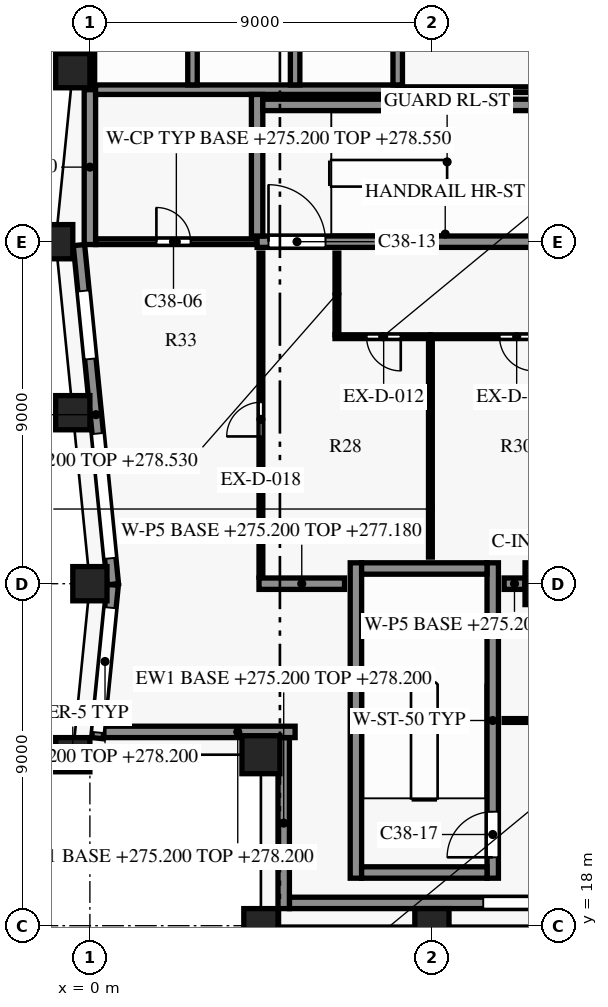
"""IFC4 building model, lengths in metres.
Left out: names, types, materials, properties, quantities, classifications, styles, units other than length and angle.
Written with IfcOpenShell. Run it as: python <this file> out.ifc"""

import sys

from ifc_helpers import new_model, si_unit, direction, frame, frame_2d, origin, origin_2d, place, context, subcontext, project, spatial, rectangle, extrude, element, fill, save


model = new_model("IFC4")
c1 = context("Model", 3, precision=1e-05, world=origin(), true_north=direction((0.0, 1.0)))
c2 = subcontext(c1, "Body", "Model", "MODEL_VIEW")
j1 = project(units=[si_unit("LENGTHUNIT", "METRE"), si_unit("PLANEANGLEUNIT", "RADIAN")], contexts=[c1])
p1 = place(None, origin())
s1 = spatial("IfcSite", under=j1, at=p1, CompositionType="ELEMENT")
p2 = place(p1, origin())
s2 = spatial("IfcBuilding", under=s1, at=p2, CompositionType="ELEMENT")
p3 = place(p2, frame((0.0, 0.0, 275.2)))
s3 = spatial("IfcBuildingStorey", under=s2, at=p3, CompositionType="ELEMENT", Elevation=275.2)
for number, where, z_axis, x_axis in (
    (1, (4.5, 18.0, 0.0), (0.0, 0.0, 1.0), (1.0, 0.0, 0.0)),
    (2, (9.0, 18.0, 0.0), (0.0, 0.0, 1.0), (1.0, 0.0, 0.0)),
    (3, (-0.45, 40.5, 0.0), (0.0, 0.0, 1.0), (-0.1, -0.995, 0.0)),
    (4, (-0.9, 36.0, 0.0), (0.0, 0.0, 1.0), (0.0, -1.0, 0.0)),
    (5, (-0.45, 31.5, 0.0), (0.0, 0.0, 1.0), (0.1, -0.995, 0.0)),
    (6, (0.0, 27.0, 0.0), (0.0, 0.0, 1.0), (0.0, -1.0, 0.0)),
    (7, (-0.45, 22.5, 0.0), (0.0, 0.0, 1.0), (-0.1, -0.995, 0.0)),
):
    element("IfcColumn", number, at=place(p3, frame(where, z_axis=z_axis, x_axis=x_axis)), inside=s3, PredefinedType="COLUMN", context=c2, shape_type="SweptSolid", body=[
        extrude(rectangle(XDim=0.9, YDim=0.9, at=origin_2d()), origin(), (0.0, 0.0, 1.0), 3.8),
    ])
p4 = place(p3, frame((4.5, 22.5, 0.0), z_axis=(0.0, 0.0, 1.0), x_axis=(1.0, 0.0, 0.0)))
e8 = element("IfcColumn", 8, at=p4, inside=s3, PredefinedType="COLUMN", context=c2, shape_type="SweptSolid", body=[
    extrude(rectangle(XDim=1.0, YDim=1.0, at=origin_2d()), origin(), (0.0, 0.0, 1.0), 3.8),
])
p5 = place(p3, frame((12.0, 27.0, 0.0), z_axis=(0.0, 0.0, 1.0), x_axis=(1.0, 0.0, 0.0)))
e9 = element("IfcColumn", 9, at=p5, inside=s3, PredefinedType="COLUMN", context=c2, shape_type="SweptSolid", body=[
    extrude(rectangle(XDim=1.1, YDim=1.1, at=origin_2d()), origin(), (0.0, 0.0, 1.0), 3.8),
])
p6 = place(p3, frame((31.05, 18.6, 0.0), z_axis=(0.0, 0.0, 1.0), x_axis=(-1.0, 0.0, 0.0)))
e10 = element("IfcWall", 10, at=p6, inside=s3, PredefinedType="SOLIDWALL", context=c2, shape_type="SweptSolid", body=[
    extrude(rectangle(XDim=25.8, YDim=0.3, at=frame_2d((12.9, 0.0))), origin(), (0.0, 0.0, 1.0), 3.0),
])
p7 = place(p6, frame((0.9, 0.0, 0.75)))
e11 = element("IfcOpeningElement", 11, at=p7, cuts=e10, PredefinedType="OPENING", context=c2, shape_type="SweptSolid", body=[
    extrude(rectangle(XDim=1.8, YDim=1.8, at=frame_2d((0.9, 0.9))), frame((0.0, 0.16, 0.0), z_axis=(0.0, -1.0, 0.0), x_axis=(1.0, 0.0, 0.0)), (0.0, 0.0, 1.0), 0.32),
])
p8 = place(p6, frame((5.4, 0.0, 0.75)))
e12 = element("IfcOpeningElement", 12, at=p8, cuts=e10, PredefinedType="OPENING", context=c2, shape_type="SweptSolid", body=[
    extrude(rectangle(XDim=1.8, YDim=1.8, at=frame_2d((0.9, 0.9))), frame((0.0, 0.16, 0.0), z_axis=(0.0, -1.0, 0.0), x_axis=(1.0, 0.0, 0.0)), (0.0, 0.0, 1.0), 0.32),
])
p9 = place(p6, frame((9.15, 0.0, 0.15)))
e13 = element("IfcOpeningElement", 13, at=p9, cuts=e10, PredefinedType="OPENING", context=c2, shape_type="SweptSolid", body=[
    extrude(rectangle(XDim=3.3, YDim=2.4, at=frame_2d((1.65, 1.2))), frame((0.0, 0.16, 0.0), z_axis=(0.0, -1.0, 0.0), x_axis=(1.0, 0.0, 0.0)), (0.0, 0.0, 1.0), 0.32),
])
p10 = place(p6, frame((13.65, 0.0, 0.15)))
e14 = element("IfcOpeningElement", 14, at=p10, cuts=e10, PredefinedType="OPENING", context=c2, shape_type="SweptSolid", body=[
    extrude(rectangle(XDim=3.3, YDim=2.4, at=frame_2d((1.65, 1.2))), frame((0.0, 0.16, 0.0), z_axis=(0.0, -1.0, 0.0), x_axis=(1.0, 0.0, 0.0)), (0.0, 0.0, 1.0), 0.32),
])
p11 = place(p6, frame((18.9, 0.0, 0.75)))
e15 = element("IfcOpeningElement", 15, at=p11, cuts=e10, PredefinedType="OPENING", context=c2, shape_type="SweptSolid", body=[
    extrude(rectangle(XDim=1.8, YDim=1.8, at=frame_2d((0.9, 0.9))), frame((0.0, 0.16, 0.0), z_axis=(0.0, -1.0, 0.0), x_axis=(1.0, 0.0, 0.0)), (0.0, 0.0, 1.0), 0.32),
])
p12 = place(p3, frame((0.604, 26.985, 0.0), z_axis=(0.0, 0.0, 1.0), x_axis=(-0.099509108728, 0.995036651225, 0.0)))
e16 = element("IfcWall", 16, at=p12, inside=s3, PredefinedType="SOLIDWALL", context=c2, shape_type="SweptSolid", body=[
    extrude(rectangle(XDim=8.97, YDim=0.3, at=frame_2d((4.485, 0.0))), origin(), (0.0, 0.0, 1.0), 3.0),
])
p13 = place(p12, frame((0.686, 0.0, 0.15)))
e17 = element("IfcOpeningElement", 17, at=p13, cuts=e16, PredefinedType="OPENING", context=c2, shape_type="SweptSolid", body=[
    extrude(rectangle(XDim=3.3, YDim=2.4, at=frame_2d((1.65, 1.2))), frame((0.0, 0.16, 0.0), z_axis=(0.0, -1.0, 0.0), x_axis=(1.0, 0.0, 0.0)), (0.0, 0.0, 1.0), 0.32),
])
p14 = place(p12, frame((5.958, 0.0, 0.75)))
e18 = element("IfcOpeningElement", 18, at=p14, cuts=e16, PredefinedType="OPENING", context=c2, shape_type="SweptSolid", body=[
    extrude(rectangle(XDim=1.8, YDim=1.8, at=frame_2d((0.9, 0.9))), frame((0.0, 0.16, 0.0), z_axis=(0.0, -1.0, 0.0), x_axis=(1.0, 0.0, 0.0)), (0.0, 0.0, 1.0), 0.32),
])
p15 = place(p3, frame((0.197, 22.935, 0.0), z_axis=(0.0, 0.0, 1.0), x_axis=(0.09951564041, 0.995035997999, 0.0)))
e19 = element("IfcWall", 19, at=p15, inside=s3, PredefinedType="SOLIDWALL", context=c2, shape_type="SweptSolid", body=[
    extrude(rectangle(XDim=4.055, YDim=0.3, at=frame_2d((2.028, 0.0))), origin(), (0.0, 0.0, 1.0), 3.0),
])
p16 = place(p15, frame((0.15, 0.0, 0.15)))
e20 = element("IfcOpeningElement", 20, at=p16, cuts=e19, PredefinedType="OPENING", context=c2, shape_type="SweptSolid", body=[
    extrude(rectangle(XDim=3.3, YDim=2.4, at=frame_2d((1.65, 1.2))), frame((0.0, 0.16, 0.0), z_axis=(0.0, -1.0, 0.0), x_axis=(1.0, 0.0, 0.0)), (0.0, 0.0, 1.0), 0.32),
])
p17 = place(p3, frame((5.4, 23.1, 0.0), z_axis=(0.0, 0.0, 1.0), x_axis=(-1.0, 0.0, 0.0)))
e21 = element("IfcWall", 21, at=p17, inside=s3, PredefinedType="SOLIDWALL", context=c2, shape_type="SweptSolid", body=[
    extrude(rectangle(XDim=5.031, YDim=0.3, at=frame_2d((2.516, 0.0))), origin(), (0.0, 0.0, 1.0), 3.0),
])
p18 = place(p3, frame((5.1, 18.45, 0.0), z_axis=(0.0, 0.0, 1.0), x_axis=(0.0, 1.0, 0.0)))
e22 = element("IfcWall", 22, at=p18, inside=s3, PredefinedType="SOLIDWALL", context=c2, shape_type="SweptSolid", body=[
    extrude(rectangle(XDim=4.5, YDim=0.3, at=frame_2d((2.25, 0.0))), origin(), (0.0, 0.0, 1.0), 3.0),
])
for number, where, z_axis, x_axis in (
    (23, (7.15, 19.4, 0.0), (0.0, 0.0, 1.0), (1.0, 0.0, 0.0)),
    (24, (7.15, 27.4, 0.0), (0.0, 0.0, 1.0), (1.0, 0.0, 0.0)),
):
    element("IfcWall", number, at=place(p3, frame(where, z_axis=z_axis, x_axis=x_axis)), inside=s3, PredefinedType="SHEAR", context=c2, shape_type="SweptSolid", body=[
        extrude(rectangle(XDim=3.3, YDim=0.3, at=frame_2d((1.65, 0.0))), origin(), (0.0, 0.0, 1.0), 3.5),
    ])
p19 = place(p3, frame((0.15, 36.0, 0.0), z_axis=(0.0, 0.0, 1.0), x_axis=(1.0, 0.0, 0.0)))
e25 = element("IfcWall", 25, at=p19, inside=s3, PredefinedType="PARTITIONING", context=c2, shape_type="SweptSolid", body=[
    extrude(rectangle(XDim=4.25, YDim=0.15, at=frame_2d((2.125, 0.0))), origin(), (0.0, 0.0, 1.0), 3.35),
])
p20 = place(p19, frame((1.6, 0.0, 0.0)))
e26 = element("IfcOpeningElement", 26, at=p20, cuts=e25, PredefinedType="OPENING", context=c2, shape_type="SweptSolid", body=[
    extrude(rectangle(XDim=0.9, YDim=2.1, at=frame_2d((0.45, 1.05))), frame((0.0, 0.085, 0.0), z_axis=(0.0, -1.0, 0.0), x_axis=(1.0, 0.0, 0.0)), (0.0, 0.0, 1.0), 0.17),
])
p21 = place(p3, frame((4.4, 36.0, 0.0), z_axis=(0.0, 0.0, 1.0), x_axis=(1.0, 0.0, 0.0)))
e27 = element("IfcWall", 27, at=p21, inside=s3, PredefinedType="SHEAR", context=c2, shape_type="SweptSolid", body=[
    extrude(rectangle(XDim=8.0, YDim=0.3, at=frame_2d((4.0, 0.0))), origin(), (0.0, 0.0, 1.0), 3.5),
])
p22 = place(p21, frame((0.3, 0.0, 0.0)))
e28 = element("IfcOpeningElement", 28, at=p22, cuts=e27, PredefinedType="OPENING", context=c2, shape_type="SweptSolid", body=[
    extrude(rectangle(XDim=1.5, YDim=2.2, at=frame_2d((0.75, 1.1))), frame((0.0, 0.16, 0.0), z_axis=(0.0, -1.0, 0.0), x_axis=(1.0, 0.0, 0.0)), (0.0, 0.0, 1.0), 0.32),
])
p23 = place(p3, frame((4.55, 39.6, 0.0), z_axis=(0.0, 0.0, 1.0), x_axis=(1.0, 0.0, 0.0)))
e29 = element("IfcWall", 29, at=p23, inside=s3, PredefinedType="SHEAR", context=c2, shape_type="SweptSolid", body=[
    extrude(rectangle(XDim=7.7, YDim=0.3, at=frame_2d((3.85, 0.0))), origin(), (0.0, 0.0, 1.0), 3.5),
])
p24 = place(p3, frame((8.1, 40.0, 0.0), z_axis=(0.0, 0.0, 1.0), x_axis=(1.0, 0.0, 0.0)))
e30 = element("IfcWall", 30, at=p24, inside=s3, PredefinedType="PARTITIONING", context=c2, shape_type="SweptSolid", body=[
    extrude(rectangle(XDim=16.125, YDim=0.15, at=frame_2d((8.062, 0.0))), origin(), (0.0, 0.0, 1.0), 3.35),
])
p25 = place(p3, frame((0.15, 40.0, 0.0), z_axis=(0.0, 0.0, 1.0), x_axis=(1.0, 0.0, 0.0)))
e31 = element("IfcWall", 31, at=p25, inside=s3, PredefinedType="SHEAR", context=c2, shape_type="SweptSolid", body=[
    extrude(rectangle(XDim=7.95, YDim=0.25, at=frame_2d((3.975, 0.0))), origin(), (0.0, 0.0, 1.0), 3.5),
])
p26 = place(p3, frame((0.0, 35.925, 0.0), z_axis=(0.0, 0.0, 1.0), x_axis=(0.0, 1.0, 0.0)))
e32 = element("IfcWall", 32, at=p26, inside=s3, PredefinedType="SHEAR", context=c2, shape_type="SweptSolid", body=[
    extrude(rectangle(XDim=4.075, YDim=0.3, at=frame_2d((2.038, 0.0))), origin(), (0.0, 0.0, 1.0), 3.5),
])
p27 = place(p3, frame((0.0, 40.0, 0.0), z_axis=(0.0, 0.0, 1.0), x_axis=(0.0, 1.0, 0.0)))
e33 = element("IfcWall", 33, at=p27, inside=s3, PredefinedType="SHEAR", context=c2, shape_type="SweptSolid", body=[
    extrude(rectangle(XDim=3.325, YDim=0.25, at=frame_2d((1.663, 0.0))), origin(), (0.0, 0.0, 1.0), 3.5),
])
p28 = place(p3, frame((2.7, 40.125, 0.0), z_axis=(0.0, 0.0, 1.0), x_axis=(0.0, 1.0, 0.0)))
e34 = element("IfcWall", 34, at=p28, inside=s3, PredefinedType="SHEAR", context=c2, shape_type="SweptSolid", body=[
    extrude(rectangle(XDim=2.95, YDim=0.25, at=frame_2d((1.475, 0.0))), origin(), (0.0, 0.0, 1.0), 3.5),
])
p29 = place(p3, frame((4.4, 36.15, 0.0), z_axis=(0.0, 0.0, 1.0), x_axis=(0.0, 1.0, 0.0)))
e35 = element("IfcWall", 35, at=p29, inside=s3, PredefinedType="SHEAR", context=c2, shape_type="SweptSolid", body=[
    extrude(rectangle(XDim=3.725, YDim=0.3, at=frame_2d((1.863, 0.0))), origin(), (0.0, 0.0, 1.0), 3.5),
])
p30 = place(p3, frame((5.4, 40.125, 0.0), z_axis=(0.0, 0.0, 1.0), x_axis=(0.0, 1.0, 0.0)))
e36 = element("IfcWall", 36, at=p30, inside=s3, PredefinedType="SHEAR", context=c2, shape_type="SweptSolid", body=[
    extrude(rectangle(XDim=2.95, YDim=0.25, at=frame_2d((1.475, 0.0))), origin(), (0.0, 0.0, 1.0), 3.5),
])
p31 = place(p3, frame((7.0, 19.25, 0.0), z_axis=(0.0, 0.0, 1.0), x_axis=(0.0, 1.0, 0.0)))
e37 = element("IfcWall", 37, at=p31, inside=s3, PredefinedType="SHEAR", context=c2, shape_type="SweptSolid", body=[
    extrude(rectangle(XDim=8.3, YDim=0.3, at=frame_2d((4.15, 0.0))), origin(), (0.0, 0.0, 1.0), 3.5),
])
p32 = place(p3, frame((8.1, 40.125, 0.0), z_axis=(0.0, 0.0, 1.0), x_axis=(0.0, 1.0, 0.0)))
e38 = element("IfcWall", 38, at=p32, inside=s3, PredefinedType="SHEAR", context=c2, shape_type="SweptSolid", body=[
    extrude(rectangle(XDim=2.95, YDim=0.25, at=frame_2d((1.475, 0.0))), origin(), (0.0, 0.0, 1.0), 3.5),
])
p33 = place(p3, frame((10.6, 19.25, 0.0), z_axis=(0.0, 0.0, 1.0), x_axis=(0.0, 1.0, 0.0)))
e39 = element("IfcWall", 39, at=p33, inside=s3, PredefinedType="SHEAR", context=c2, shape_type="SweptSolid", body=[
    extrude(rectangle(XDim=8.3, YDim=0.3, at=frame_2d((4.15, 0.0))), origin(), (0.0, 0.0, 1.0), 3.5),
])
p34 = place(p33, frame((0.55, 0.0, 0.0)))
e40 = element("IfcOpeningElement", 40, at=p34, cuts=e39, PredefinedType="OPENING", context=c2, shape_type="SweptSolid", body=[
    extrude(rectangle(XDim=1.2, YDim=2.2, at=frame_2d((0.6, 1.1))), frame((0.0, 0.16, 0.0), z_axis=(0.0, -1.0, 0.0), x_axis=(1.0, 0.0, 0.0)), (0.0, 0.0, 1.0), 0.32),
])
p35 = place(p3, frame((18.0, 23.4, 0.0), z_axis=(0.0, 0.0, 1.0), x_axis=(-1.0, 0.0, 0.0)))
e41 = element("IfcWall", 41, at=p35, inside=s3, PredefinedType="PARTITIONING", context=c2, shape_type="SweptSolid", body=[
    extrude(rectangle(XDim=7.1, YDim=0.1, at=frame_2d((3.55, 0.0))), origin(), (0.0, 0.0, 1.0), 2.73),
])
p36 = place(p35, frame((2.55, 0.0, 0.0)))
e42 = element("IfcOpeningElement", 42, at=p36, cuts=e41, PredefinedType="OPENING", context=c2, shape_type="SweptSolid", body=[
    extrude(rectangle(XDim=1.8, YDim=2.1, at=frame_2d((0.9, 1.05))), frame((0.0, 0.06, 0.0), z_axis=(0.0, -1.0, 0.0), x_axis=(1.0, 0.0, 0.0)), (0.0, 0.0, 1.0), 0.12),
])
p37 = place(p3, frame((6.7, 27.0, 0.0), z_axis=(0.0, 0.0, 1.0), x_axis=(-1.0, 0.0, 0.0)))
e43 = element("IfcWall", 43, at=p37, inside=s3, PredefinedType="PARTITIONING", context=c2, shape_type="SweptSolid", body=[
    extrude(rectangle(XDim=2.25, YDim=0.3, at=frame_2d((1.125, 0.0))), origin(), (0.0, 0.0, 1.0), 1.98),
])
p38 = place(p3, frame((10.9, 27.0, 0.0), z_axis=(0.0, 0.0, 1.0), x_axis=(1.0, 0.0, 0.0)))
e44 = element("IfcWall", 44, at=p38, inside=s3, PredefinedType="PARTITIONING", context=c2, shape_type="SweptSolid", body=[
    extrude(rectangle(XDim=0.545, YDim=0.3, at=frame_2d((0.272, 0.0))), origin(), (0.0, 0.0, 1.0), 3.33),
])
p39 = place(p3, frame((4.5, 27.17, 0.0), z_axis=(0.0, 0.0, 1.0), x_axis=(0.0, 1.0, 0.0)))
e45 = element("IfcWall", 45, at=p39, inside=s3, PredefinedType="PARTITIONING", context=c2, shape_type="SweptSolid", body=[
    extrude(rectangle(XDim=8.53, YDim=0.1, at=frame_2d((4.265, 0.0))), origin(), (0.0, 0.0, 1.0), 1.98),
])
p40 = place(p39, frame((3.705, 0.0, 0.0)))
e46 = element("IfcOpeningElement", 46, at=p40, cuts=e45, PredefinedType="OPENING", context=c2, shape_type="SweptSolid", body=[
    extrude(rectangle(XDim=0.9, YDim=2.1, at=frame_2d((0.45, 1.05))), frame((0.0, 0.06, 0.0), z_axis=(0.0, -1.0, 0.0), x_axis=(1.0, 0.0, 0.0)), (0.0, 0.0, 1.0), 0.12),
])
p41 = place(p3, frame((8.96, 33.45, 0.0), z_axis=(0.0, 0.0, 1.0), x_axis=(0.0, -1.0, 0.0)))
e47 = element("IfcWall", 47, at=p41, inside=s3, PredefinedType="PARTITIONING", context=c2, shape_type="SweptSolid", body=[
    extrude(rectangle(XDim=5.75, YDim=0.1, at=frame_2d((2.875, 0.0))), origin(), (0.0, 0.0, 1.0), 3.33),
])
p42 = place(p3, frame((8.96, 33.5, 0.0), z_axis=(0.0, 0.0, 1.0), x_axis=(-1.0, 0.0, 0.0)))
e48 = element("IfcWall", 48, at=p42, inside=s3, PredefinedType="PARTITIONING", context=c2, shape_type="SweptSolid", body=[
    extrude(rectangle(XDim=2.51, YDim=0.1, at=frame_2d((1.255, 0.0))), origin(), (0.0, 0.0, 1.0), 3.33),
])
p43 = place(p42, frame((0.78, 0.0, 0.0)))
e49 = element("IfcOpeningElement", 49, at=p43, cuts=e48, PredefinedType="OPENING", context=c2, shape_type="SweptSolid", body=[
    extrude(rectangle(XDim=0.9, YDim=2.1, at=frame_2d((0.45, 1.05))), frame((0.0, 0.06, 0.0), z_axis=(0.0, -1.0, 0.0), x_axis=(1.0, 0.0, 0.0)), (0.0, 0.0, 1.0), 0.12),
])
p44 = place(p3, frame((13.5, 33.5, 0.0), z_axis=(0.0, 0.0, 1.0), x_axis=(-1.0, 0.0, 0.0)))
e50 = element("IfcWall", 50, at=p44, inside=s3, PredefinedType="PARTITIONING", context=c2, shape_type="SweptSolid", body=[
    extrude(rectangle(XDim=4.54, YDim=0.1, at=frame_2d((2.27, 0.0))), origin(), (0.0, 0.0, 1.0), 1.98),
])
p45 = place(p44, frame((1.82, 0.0, 0.0)))
e51 = element("IfcOpeningElement", 51, at=p45, cuts=e50, PredefinedType="OPENING", context=c2, shape_type="SweptSolid", body=[
    extrude(rectangle(XDim=0.9, YDim=2.1, at=frame_2d((0.45, 1.05))), frame((0.0, 0.06, 0.0), z_axis=(0.0, -1.0, 0.0), x_axis=(1.0, 0.0, 0.0)), (0.0, 0.0, 1.0), 0.12),
])
p46 = place(p3, frame((6.5, 33.55, 0.0), z_axis=(0.0, 0.0, 1.0), x_axis=(0.0, 1.0, 0.0)))
e52 = element("IfcWall", 52, at=p46, inside=s3, PredefinedType="PARTITIONING", context=c2, shape_type="SweptSolid", body=[
    extrude(rectangle(XDim=2.15, YDim=0.1, at=frame_2d((1.075, 0.0))), origin(), (0.0, 0.0, 1.0), 3.33),
])
p47 = place(p11, origin())
e53 = element("IfcWindow", 53, at=p47, inside=s3, PartitioningType="SINGLE_PANEL", PredefinedType="WINDOW", context=c2, shape_type="SweptSolid", body=[
    extrude(rectangle(XDim=1.8, YDim=1.8, at=frame_2d((0.9, 0.9))), frame((0.0, 0.03, 0.0), z_axis=(0.0, -1.0, 0.0), x_axis=(1.0, 0.0, 0.0)), (0.0, 0.0, 1.0), 0.06),
])
fill(e15, e53)
p48 = place(p13, origin())
e54 = element("IfcWindow", 54, at=p48, inside=s3, PartitioningType="SINGLE_PANEL", PredefinedType="WINDOW", context=c2, shape_type="SweptSolid", body=[
    extrude(rectangle(XDim=3.3, YDim=2.4, at=frame_2d((1.65, 1.2))), frame((0.0, 0.03, 0.0), z_axis=(0.0, -1.0, 0.0), x_axis=(1.0, 0.0, 0.0)), (0.0, 0.0, 1.0), 0.06),
])
fill(e17, e54)
p49 = place(p14, origin())
e55 = element("IfcWindow", 55, at=p49, inside=s3, PartitioningType="SINGLE_PANEL", PredefinedType="WINDOW", context=c2, shape_type="SweptSolid", body=[
    extrude(rectangle(XDim=1.8, YDim=1.8, at=frame_2d((0.9, 0.9))), frame((0.0, 0.03, 0.0), z_axis=(0.0, -1.0, 0.0), x_axis=(1.0, 0.0, 0.0)), (0.0, 0.0, 1.0), 0.06),
])
fill(e18, e55)
p50 = place(p16, origin())
e56 = element("IfcWindow", 56, at=p50, inside=s3, PartitioningType="SINGLE_PANEL", PredefinedType="WINDOW", context=c2, shape_type="SweptSolid", body=[
    extrude(rectangle(XDim=3.3, YDim=2.4, at=frame_2d((1.65, 1.2))), frame((0.0, 0.03, 0.0), z_axis=(0.0, -1.0, 0.0), x_axis=(1.0, 0.0, 0.0)), (0.0, 0.0, 1.0), 0.06),
])
fill(e20, e56)
p51 = place(p20, origin())
e57 = element("IfcDoor", 57, at=p51, inside=s3, OperationType="SINGLE_SWING_LEFT", PredefinedType="DOOR", context=c2, shape_type="SweptSolid", body=[
    extrude(rectangle(XDim=0.9, YDim=2.1, at=frame_2d((0.45, 1.05))), frame((0.0, 0.025, 0.0), z_axis=(0.0, -1.0, 0.0), x_axis=(1.0, 0.0, 0.0)), (0.0, 0.0, 1.0), 0.05),
])
fill(e26, e57)
p52 = place(p22, origin())
e58 = element("IfcDoor", 58, at=p52, inside=s3, OperationType="SINGLE_SWING_RIGHT", PredefinedType="DOOR", context=c2, shape_type="SweptSolid", body=[
    extrude(rectangle(XDim=1.5, YDim=2.2, at=frame_2d((0.75, 1.1))), frame((0.0, 0.025, 0.0), z_axis=(0.0, -1.0, 0.0), x_axis=(1.0, 0.0, 0.0)), (0.0, 0.0, 1.0), 0.05),
])
fill(e28, e58)
p53 = place(p34, origin())
e59 = element("IfcDoor", 59, at=p53, inside=s3, OperationType="SINGLE_SWING_RIGHT", PredefinedType="DOOR", context=c2, shape_type="SweptSolid", body=[
    extrude(rectangle(XDim=1.2, YDim=2.2, at=frame_2d((0.6, 1.1))), frame((0.0, 0.025, 0.0), z_axis=(0.0, -1.0, 0.0), x_axis=(1.0, 0.0, 0.0)), (0.0, 0.0, 1.0), 0.05),
])
fill(e40, e59)
p54 = place(p43, origin())
e60 = element("IfcDoor", 60, at=p54, inside=s3, OperationType="SINGLE_SWING_LEFT", PredefinedType="DOOR", context=c2, shape_type="SweptSolid", body=[
    extrude(rectangle(XDim=0.9, YDim=2.1, at=frame_2d((0.45, 1.05))), frame((0.0, 0.025, 0.0), z_axis=(0.0, -1.0, 0.0), x_axis=(1.0, 0.0, 0.0)), (0.0, 0.0, 1.0), 0.05),
])
fill(e49, e60)
p55 = place(p45, origin())
e61 = element("IfcDoor", 61, at=p55, inside=s3, OperationType="SINGLE_SWING_LEFT", PredefinedType="DOOR", context=c2, shape_type="SweptSolid", body=[
    extrude(rectangle(XDim=0.9, YDim=2.1, at=frame_2d((0.45, 1.05))), frame((0.0, 0.025, 0.0), z_axis=(0.0, -1.0, 0.0), x_axis=(1.0, 0.0, 0.0)), (0.0, 0.0, 1.0), 0.05),
])
fill(e51, e61)
p56 = place(p40, origin())
e62 = element("IfcDoor", 62, at=p56, inside=s3, OperationType="SINGLE_SWING_RIGHT", PredefinedType="DOOR", context=c2, shape_type="SweptSolid", body=[
    extrude(rectangle(XDim=0.9, YDim=2.1, at=frame_2d((0.45, 1.05))), frame((0.0, 0.025, 0.0), z_axis=(0.0, -1.0, 0.0), x_axis=(1.0, 0.0, 0.0)), (0.0, 0.0, 1.0), 0.05),
])
fill(e46, e62)
save(model, sys.argv[1])
